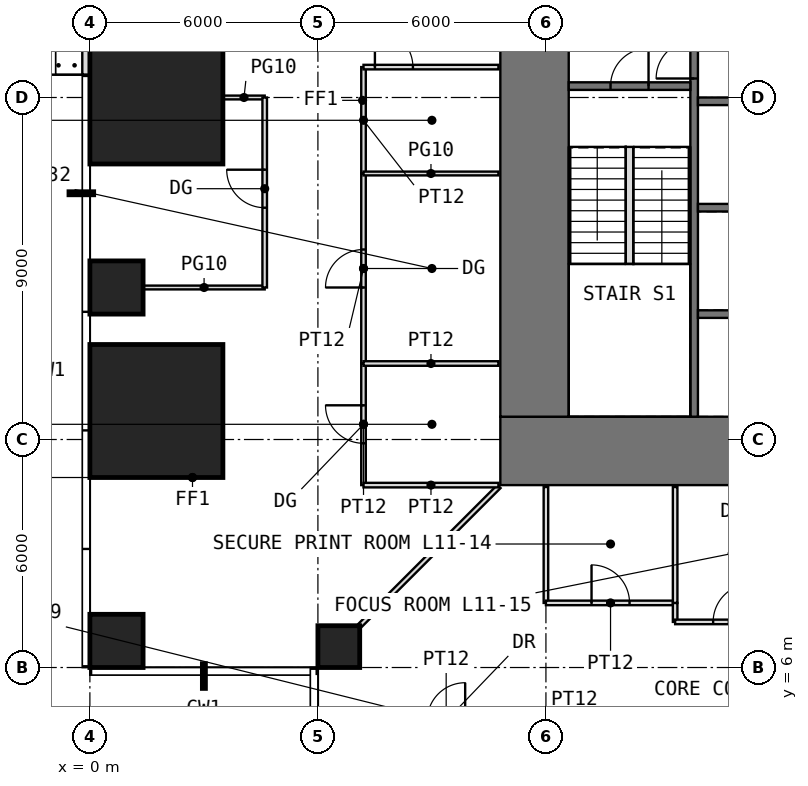
"""IFC4 building model, lengths in metres.
Left out: names, types, materials, properties, quantities, classifications, styles, units other than length and angle.
Written with IfcOpenShell. Run it as: python <this file> out.ifc"""

import sys

from ifc_helpers import new_model, si_unit, direction, frame, frame_2d, origin, origin_2d, place, context, subcontext, project, spatial, rectangle, extrude, element, fill, save


model = new_model("IFC4")
c1 = context("Model", 3, precision=1e-05, world=origin(), true_north=direction((0.0, 1.0)))
c2 = subcontext(c1, "Body", "Model", "MODEL_VIEW")
j1 = project(units=[si_unit("LENGTHUNIT", "METRE"), si_unit("PLANEANGLEUNIT", "RADIAN")], contexts=[c1])
p1 = place(None, origin())
s1 = spatial("IfcSite", under=j1, at=p1, CompositionType="ELEMENT")
p2 = place(p1, origin())
s2 = spatial("IfcBuilding", under=s1, at=p2, CompositionType="ELEMENT")
p3 = place(p2, frame((0.0, 0.0, 50.5)))
s3 = spatial("IfcBuildingStorey", under=s2, at=p3, CompositionType="ELEMENT", Elevation=50.5)
p4 = place(p3, frame((0.7, 6.7, 0.0), z_axis=(0.0, 0.0, 1.0), x_axis=(1.0, 0.0, 0.0)))
e1 = element("IfcColumn", 1, at=p4, inside=s3, PredefinedType="COLUMN", context=c2, shape_type="SweptSolid", body=[
    extrude(rectangle(XDim=1.4, YDim=1.4, at=origin_2d()), origin(), (0.0, 0.0, 1.0), 4.0),
])
p5 = place(p3, frame((6.55, 6.55, 0.0), z_axis=(0.0, 0.0, 1.0), x_axis=(1.0, 0.0, 0.0)))
e2 = element("IfcColumn", 2, at=p5, inside=s3, PredefinedType="COLUMN", context=c2, shape_type="SweptSolid", body=[
    extrude(rectangle(XDim=1.1, YDim=1.1, at=origin_2d()), origin(), (0.0, 0.0, 1.0), 4.0),
])
p6 = place(p3, frame((1.75, 12.75, 0.0), z_axis=(0.0, 0.0, 1.0), x_axis=(1.0, 0.0, 0.0)))
e3 = element("IfcColumn", 3, at=p6, inside=s3, PredefinedType="COLUMN", context=c2, shape_type="SweptSolid", body=[
    extrude(rectangle(XDim=3.5, YDim=3.5, at=origin_2d()), origin(), (0.0, 0.0, 1.0), 4.0),
])
p7 = place(p3, frame((0.7, 16.0, 0.0), z_axis=(0.0, 0.0, 1.0), x_axis=(1.0, 0.0, 0.0)))
e4 = element("IfcColumn", 4, at=p7, inside=s3, PredefinedType="COLUMN", context=c2, shape_type="SweptSolid", body=[
    extrude(rectangle(XDim=1.4, YDim=1.4, at=origin_2d()), origin(), (0.0, 0.0, 1.0), 4.0),
])
p8 = place(p3, frame((1.75, 21.0, 0.0), z_axis=(0.0, 0.0, 1.0), x_axis=(1.0, 0.0, 0.0)))
e5 = element("IfcColumn", 5, at=p8, inside=s3, PredefinedType="COLUMN", context=c2, shape_type="SweptSolid", body=[
    extrude(rectangle(XDim=3.5, YDim=3.5, at=origin_2d()), origin(), (0.0, 0.0, 1.0), 4.0),
])
p9 = place(p3, frame((-0.1, 25.4, 0.0), z_axis=(0.0, 0.0, 1.0), x_axis=(0.0, -1.0, 0.0)))
e6 = element("IfcWall", 6, at=p9, inside=s3, PredefinedType="USERDEFINED", context=c2, shape_type="SweptSolid", body=[
    extrude(rectangle(XDim=3.8, YDim=0.2, at=frame_2d((1.9, 0.0))), origin(), (0.0, 0.0, 1.0), 3.75),
])
p10 = place(p9, frame((1.5, 0.0, 0.0)))
e7 = element("IfcOpeningElement", 7, at=p10, cuts=e6, PredefinedType="OPENING", context=c2, shape_type="SweptSolid", body=[
    extrude(rectangle(XDim=1.0, YDim=2.4, at=frame_2d((0.5, 1.2))), frame((0.0, 0.11, 0.0), z_axis=(0.0, -1.0, 0.0), x_axis=(1.0, 0.0, 0.0)), (0.0, 0.0, 1.0), 0.22),
])
p11 = place(p3, frame((10.8, 11.7, -0.05), z_axis=(0.0, 0.0, 1.0), x_axis=(1.0, 0.0, 0.0)))
e8 = element("IfcWall", 8, at=p11, inside=s3, PredefinedType="SHEAR", context=c2, shape_type="SweptSolid", body=[
    extrude(rectangle(XDim=20.4, YDim=1.8, at=frame_2d((10.2, 0.0))), origin(), (0.0, 0.0, 1.0), 4.0),
])
p12 = place(p11, frame((9.2, 0.0, 0.05)))
e9 = element("IfcOpeningElement", 9, at=p12, cuts=e8, PredefinedType="OPENING", context=c2, shape_type="SweptSolid", body=[
    extrude(rectangle(XDim=2.0, YDim=2.2, at=frame_2d((1.0, 1.1))), frame((0.0, 0.91, 0.0), z_axis=(0.0, -1.0, 0.0), x_axis=(1.0, 0.0, 0.0)), (0.0, 0.0, 1.0), 1.82),
])
p13 = place(p3, frame((11.7, 12.6, -0.05), z_axis=(0.0, 0.0, 1.0), x_axis=(0.0, 1.0, 0.0)))
e10 = element("IfcWall", 10, at=p13, inside=s3, PredefinedType="SHEAR", context=c2, shape_type="SweptSolid", body=[
    extrude(rectangle(XDim=16.8, YDim=1.8, at=frame_2d((8.4, 0.0))), origin(), (0.0, 0.0, 1.0), 4.0),
])
p14 = place(p13, frame((9.9, 0.0, 0.05)))
e11 = element("IfcOpeningElement", 11, at=p14, cuts=e10, PredefinedType="OPENING", context=c2, shape_type="SweptSolid", body=[
    extrude(rectangle(XDim=1.0, YDim=2.2, at=frame_2d((0.5, 1.1))), frame((0.0, 0.91, 0.0), z_axis=(0.0, -1.0, 0.0), x_axis=(1.0, 0.0, 0.0)), (0.0, 0.0, 1.0), 1.82),
])
p15 = place(p3, frame((15.9, 12.6, -0.05), z_axis=(0.0, 0.0, 1.0), x_axis=(0.0, 1.0, 0.0)))
e12 = element("IfcWall", 12, at=p15, inside=s3, PredefinedType="SHEAR", context=c2, shape_type="SweptSolid", body=[
    extrude(rectangle(XDim=16.8, YDim=0.2, at=frame_2d((8.4, 0.0))), origin(), (0.0, 0.0, 1.0), 4.0),
])
p16 = place(p15, frame((8.9, 0.0, 0.05)))
e13 = element("IfcOpeningElement", 13, at=p16, cuts=e12, PredefinedType="OPENING", context=c2, shape_type="SweptSolid", body=[
    extrude(rectangle(XDim=1.0, YDim=2.2, at=frame_2d((0.5, 1.1))), frame((0.0, 0.11, 0.0), z_axis=(0.0, -1.0, 0.0), x_axis=(1.0, 0.0, 0.0)), (0.0, 0.0, 1.0), 0.22),
])
p17 = place(p3, frame((12.6, 21.3, -0.05), z_axis=(0.0, 0.0, 1.0), x_axis=(1.0, 0.0, 0.0)))
e14 = element("IfcWall", 14, at=p17, inside=s3, PredefinedType="SHEAR", context=c2, shape_type="SweptSolid", body=[
    extrude(rectangle(XDim=3.2, YDim=0.2, at=frame_2d((1.6, 0.0))), origin(), (0.0, 0.0, 1.0), 4.0),
])
p18 = place(p17, frame((1.1, 0.0, 0.05)))
e15 = element("IfcOpeningElement", 15, at=p18, cuts=e14, PredefinedType="OPENING", context=c2, shape_type="SweptSolid", body=[
    extrude(rectangle(XDim=1.0, YDim=2.2, at=frame_2d((0.5, 1.1))), frame((0.0, 0.11, 0.0), z_axis=(0.0, -1.0, 0.0), x_axis=(1.0, 0.0, 0.0)), (0.0, 0.0, 1.0), 0.22),
])
for number, where, z_axis, x_axis in (
    (16, (16.0, 15.3, -0.05), (0.0, 0.0, 1.0), (1.0, 0.0, 0.0)),
    (17, (16.0, 18.1, -0.05), (0.0, 0.0, 1.0), (1.0, 0.0, 0.0)),
    (18, (16.0, 20.9, -0.05), (0.0, 0.0, 1.0), (1.0, 0.0, 0.0)),
):
    element("IfcWall", number, at=place(p3, frame(where, z_axis=z_axis, x_axis=x_axis)), inside=s3, PredefinedType="SHEAR", context=c2, shape_type="SweptSolid", body=[
        extrude(rectangle(XDim=3.2, YDim=0.2, at=frame_2d((1.6, 0.0))), origin(), (0.0, 0.0, 1.0), 4.0),
    ])
p19 = place(p3, frame((1.41, 16.0, 0.0), z_axis=(0.0, 0.0, 1.0), x_axis=(1.0, 0.0, 0.0)))
e19 = element("IfcWall", 19, at=p19, inside=s3, PredefinedType="PARTITIONING", context=c2, shape_type="SweptSolid", body=[
    extrude(rectangle(XDim=3.19, YDim=0.1, at=frame_2d((1.595, 0.0))), origin(), (0.0, 0.0, 1.0), 3.75),
])
p20 = place(p3, frame((3.51, 21.0, 0.0), z_axis=(0.0, 0.0, 1.0), x_axis=(1.0, 0.0, 0.0)))
e20 = element("IfcWall", 20, at=p20, inside=s3, PredefinedType="PARTITIONING", context=c2, shape_type="SweptSolid", body=[
    extrude(rectangle(XDim=1.09, YDim=0.1, at=frame_2d((0.545, 0.0))), origin(), (0.0, 0.0, 1.0), 3.75),
])
p21 = place(p3, frame((4.6, 16.0, 0.0), z_axis=(0.0, 0.0, 1.0), x_axis=(0.0, 1.0, 0.0)))
e21 = element("IfcWall", 21, at=p21, inside=s3, PredefinedType="PARTITIONING", context=c2, shape_type="SweptSolid", body=[
    extrude(rectangle(XDim=5.0, YDim=0.12, at=frame_2d((2.5, 0.0))), origin(), (0.0, 0.0, 1.0), 3.75),
])
p22 = place(p21, frame((2.1, 0.0, 0.0)))
e22 = element("IfcOpeningElement", 22, at=p22, cuts=e21, PredefinedType="OPENING", context=c2, shape_type="SweptSolid", body=[
    extrude(rectangle(XDim=1.0, YDim=2.4, at=frame_2d((0.5, 1.2))), frame((0.0, 0.07, 0.0), z_axis=(0.0, -1.0, 0.0), x_axis=(1.0, 0.0, 0.0)), (0.0, 0.0, 1.0), 0.14),
])
p23 = place(p3, frame((7.11, 7.11, 0.0), z_axis=(0.0, 0.0, 1.0), x_axis=(0.707106781187, 0.707106781187, 0.0)))
e23 = element("IfcWall", 23, at=p23, inside=s3, PredefinedType="PARTITIONING", context=c2, shape_type="SweptSolid", body=[
    extrude(rectangle(XDim=5.168, YDim=0.12, at=frame_2d((2.584, 0.0))), origin(), (0.0, 0.0, 1.0), 3.75),
])
p24 = place(p3, frame((7.2, 10.8, 0.0), z_axis=(0.0, 0.0, 1.0), x_axis=(0.0, 1.0, 0.0)))
e24 = element("IfcWall", 24, at=p24, inside=s3, PredefinedType="PARTITIONING", context=c2, shape_type="SweptSolid", body=[
    extrude(rectangle(XDim=3.2, YDim=0.12, at=frame_2d((1.6, 0.0))), origin(), (0.0, 0.0, 1.0), 3.75),
])
p25 = place(p24, frame((1.1, 0.0, 0.0)))
e25 = element("IfcOpeningElement", 25, at=p25, cuts=e24, PredefinedType="OPENING", context=c2, shape_type="SweptSolid", body=[
    extrude(rectangle(XDim=1.0, YDim=2.4, at=frame_2d((0.5, 1.2))), frame((0.0, 0.07, 0.0), z_axis=(0.0, -1.0, 0.0), x_axis=(1.0, 0.0, 0.0)), (0.0, 0.0, 1.0), 0.14),
])
p26 = place(p3, frame((7.2, 10.8, 0.0), z_axis=(0.0, 0.0, 1.0), x_axis=(1.0, 0.0, 0.0)))
e26 = element("IfcWall", 26, at=p26, inside=s3, PredefinedType="PARTITIONING", context=c2, shape_type="SweptSolid", body=[
    extrude(rectangle(XDim=3.55, YDim=0.12, at=frame_2d((1.775, 0.0))), origin(), (0.0, 0.0, 1.0), 3.75),
])
p27 = place(p3, frame((7.2, 14.0, 0.0), z_axis=(0.0, 0.0, 1.0), x_axis=(0.0, 1.0, 0.0)))
e27 = element("IfcWall", 27, at=p27, inside=s3, PredefinedType="PARTITIONING", context=c2, shape_type="SweptSolid", body=[
    extrude(rectangle(XDim=5.0, YDim=0.12, at=frame_2d((2.5, 0.0))), origin(), (0.0, 0.0, 1.0), 3.75),
])
p28 = place(p27, frame((2.0, 0.0, 0.0)))
e28 = element("IfcOpeningElement", 28, at=p28, cuts=e27, PredefinedType="OPENING", context=c2, shape_type="SweptSolid", body=[
    extrude(rectangle(XDim=1.0, YDim=2.4, at=frame_2d((0.5, 1.2))), frame((0.0, 0.07, 0.0), z_axis=(0.0, -1.0, 0.0), x_axis=(1.0, 0.0, 0.0)), (0.0, 0.0, 1.0), 0.14),
])
p29 = place(p3, frame((7.2, 14.0, 0.0), z_axis=(0.0, 0.0, 1.0), x_axis=(1.0, 0.0, 0.0)))
e29 = element("IfcWall", 29, at=p29, inside=s3, PredefinedType="PARTITIONING", context=c2, shape_type="SweptSolid", body=[
    extrude(rectangle(XDim=3.55, YDim=0.12, at=frame_2d((1.775, 0.0))), origin(), (0.0, 0.0, 1.0), 3.75),
])
p30 = place(p3, frame((7.2, 19.0, 0.0), z_axis=(0.0, 0.0, 1.0), x_axis=(0.0, 1.0, 0.0)))
e30 = element("IfcWall", 30, at=p30, inside=s3, PredefinedType="PARTITIONING", context=c2, shape_type="SweptSolid", body=[
    extrude(rectangle(XDim=2.8, YDim=0.12, at=frame_2d((1.4, 0.0))), origin(), (0.0, 0.0, 1.0), 3.75),
])
p31 = place(p3, frame((7.2, 19.0, 0.0), z_axis=(0.0, 0.0, 1.0), x_axis=(1.0, 0.0, 0.0)))
e31 = element("IfcWall", 31, at=p31, inside=s3, PredefinedType="PARTITIONING", context=c2, shape_type="SweptSolid", body=[
    extrude(rectangle(XDim=3.55, YDim=0.1, at=frame_2d((1.775, 0.0))), origin(), (0.0, 0.0, 1.0), 3.75),
])
p32 = place(p3, frame((7.2, 21.8, 0.0), z_axis=(0.0, 0.0, 1.0), x_axis=(1.0, 0.0, 0.0)))
e32 = element("IfcWall", 32, at=p32, inside=s3, PredefinedType="PARTITIONING", context=c2, shape_type="SweptSolid", body=[
    extrude(rectangle(XDim=3.55, YDim=0.12, at=frame_2d((1.775, 0.0))), origin(), (0.0, 0.0, 1.0), 3.75),
])
p33 = place(p32, frame((0.3, 0.0, 0.0)))
e33 = element("IfcOpeningElement", 33, at=p33, cuts=e32, PredefinedType="OPENING", context=c2, shape_type="SweptSolid", body=[
    extrude(rectangle(XDim=1.0, YDim=2.4, at=frame_2d((0.5, 1.2))), frame((0.0, 0.07, 0.0), z_axis=(0.0, -1.0, 0.0), x_axis=(1.0, 0.0, 0.0)), (0.0, 0.0, 1.0), 0.14),
])
p34 = place(p3, frame((12.0, 7.7, 0.0), z_axis=(0.0, 0.0, 1.0), x_axis=(0.0, 1.0, 0.0)))
e34 = element("IfcWall", 34, at=p34, inside=s3, PredefinedType="PARTITIONING", context=c2, shape_type="SweptSolid", body=[
    extrude(rectangle(XDim=3.05, YDim=0.12, at=frame_2d((1.525, 0.0))), origin(), (0.0, 0.0, 1.0), 3.75),
])
p35 = place(p3, frame((12.0, 7.7, 0.0), z_axis=(0.0, 0.0, 1.0), x_axis=(1.0, 0.0, 0.0)))
e35 = element("IfcWall", 35, at=p35, inside=s3, PredefinedType="PARTITIONING", context=c2, shape_type="SweptSolid", body=[
    extrude(rectangle(XDim=3.4, YDim=0.12, at=frame_2d((1.7, 0.0))), origin(), (0.0, 0.0, 1.0), 3.75),
])
p36 = place(p35, frame((1.2, 0.0, 0.0)))
e36 = element("IfcOpeningElement", 36, at=p36, cuts=e35, PredefinedType="OPENING", context=c2, shape_type="SweptSolid", body=[
    extrude(rectangle(XDim=1.0, YDim=2.2, at=frame_2d((0.5, 1.1))), frame((0.0, 0.07, 0.0), z_axis=(0.0, -1.0, 0.0), x_axis=(1.0, 0.0, 0.0)), (0.0, 0.0, 1.0), 0.14),
])
p37 = place(p3, frame((15.4, 7.2, 0.0), z_axis=(0.0, 0.0, 1.0), x_axis=(0.0, 1.0, 0.0)))
e37 = element("IfcWall", 37, at=p37, inside=s3, PredefinedType="PARTITIONING", context=c2, shape_type="SweptSolid", body=[
    extrude(rectangle(XDim=0.5, YDim=0.12, at=frame_2d((0.25, 0.0))), origin(), (0.0, 0.0, 1.0), 3.75),
])
p38 = place(p3, frame((15.4, 7.2, 0.0), z_axis=(0.0, 0.0, 1.0), x_axis=(1.0, 0.0, 0.0)))
e38 = element("IfcWall", 38, at=p38, inside=s3, PredefinedType="PARTITIONING", context=c2, shape_type="SweptSolid", body=[
    extrude(rectangle(XDim=3.0, YDim=0.12, at=frame_2d((1.5, 0.0))), origin(), (0.0, 0.0, 1.0), 3.75),
])
p39 = place(p38, frame((1.0, 0.0, 0.0)))
e39 = element("IfcOpeningElement", 39, at=p39, cuts=e38, PredefinedType="OPENING", context=c2, shape_type="SweptSolid", body=[
    extrude(rectangle(XDim=1.0, YDim=2.4, at=frame_2d((0.5, 1.2))), frame((0.0, 0.07, 0.0), z_axis=(0.0, -1.0, 0.0), x_axis=(1.0, 0.0, 0.0)), (0.0, 0.0, 1.0), 0.14),
])
p40 = place(p3, frame((15.4, 7.7, 0.0), z_axis=(0.0, 0.0, 1.0), x_axis=(0.0, 1.0, 0.0)))
e40 = element("IfcWall", 40, at=p40, inside=s3, PredefinedType="PARTITIONING", context=c2, shape_type="SweptSolid", body=[
    extrude(rectangle(XDim=3.05, YDim=0.12, at=frame_2d((1.525, 0.0))), origin(), (0.0, 0.0, 1.0), 3.75),
])
p41 = place(p3, frame((14.2, 16.62, 0.0), z_axis=(0.0, 0.0, 1.0), x_axis=(0.0, 1.0, 0.0)))
e41 = element("IfcWall", 41, at=p41, inside=s3, PredefinedType="PARTITIONING", context=c2, shape_type="SweptSolid", body=[
    extrude(rectangle(XDim=3.08, YDim=0.2, at=frame_2d((1.54, 0.0))), origin(), (0.0, 0.0, 1.0), 4.0),
])
p42 = place(p18, origin())
e42 = element("IfcDoor", 42, at=p42, inside=s3, OperationType="SINGLE_SWING_RIGHT", PredefinedType="DOOR", context=c2, shape_type="SweptSolid", body=[
    extrude(rectangle(XDim=1.0, YDim=2.2, at=frame_2d((0.5, 1.1))), frame((0.0, 0.025, 0.0), z_axis=(0.0, -1.0, 0.0), x_axis=(1.0, 0.0, 0.0)), (0.0, 0.0, 1.0), 0.05),
])
fill(e15, e42)
p43 = place(p16, origin())
e43 = element("IfcDoor", 43, at=p43, inside=s3, OperationType="SINGLE_SWING_LEFT", PredefinedType="DOOR", context=c2, shape_type="SweptSolid", body=[
    extrude(rectangle(XDim=1.0, YDim=2.2, at=frame_2d((0.5, 1.1))), frame((0.0, 0.025, 0.0), z_axis=(0.0, -1.0, 0.0), x_axis=(1.0, 0.0, 0.0)), (0.0, 0.0, 1.0), 0.05),
])
fill(e13, e43)
p44 = place(p36, origin())
e44 = element("IfcDoor", 44, at=p44, inside=s3, OperationType="SINGLE_SWING_LEFT", PredefinedType="DOOR", context=c2, shape_type="SweptSolid", body=[
    extrude(rectangle(XDim=1.0, YDim=2.2, at=frame_2d((0.5, 1.1))), frame((0.0, 0.025, 0.0), z_axis=(0.0, -1.0, 0.0), x_axis=(1.0, 0.0, 0.0)), (0.0, 0.0, 1.0), 0.05),
])
fill(e36, e44)
p45 = place(p39, origin())
e45 = element("IfcDoor", 45, at=p45, inside=s3, OperationType="SINGLE_SWING_RIGHT", PredefinedType="DOOR", context=c2, shape_type="SweptSolid", body=[
    extrude(rectangle(XDim=1.0, YDim=2.4, at=frame_2d((0.5, 1.2))), frame((0.0, 0.025, 0.0), z_axis=(0.0, -1.0, 0.0), x_axis=(1.0, 0.0, 0.0)), (0.0, 0.0, 1.0), 0.05),
])
fill(e39, e45)
p46 = place(p25, origin())
e46 = element("IfcDoor", 46, at=p46, inside=s3, OperationType="SINGLE_SWING_RIGHT", PredefinedType="DOOR", context=c2, shape_type="SweptSolid", body=[
    extrude(rectangle(XDim=1.0, YDim=2.4, at=frame_2d((0.5, 1.2))), frame((0.0, 0.025, 0.0), z_axis=(0.0, -1.0, 0.0), x_axis=(1.0, 0.0, 0.0)), (0.0, 0.0, 1.0), 0.05),
])
fill(e25, e46)
p47 = place(p28, origin())
e47 = element("IfcDoor", 47, at=p47, inside=s3, OperationType="SINGLE_SWING_LEFT", PredefinedType="DOOR", context=c2, shape_type="SweptSolid", body=[
    extrude(rectangle(XDim=1.0, YDim=2.4, at=frame_2d((0.5, 1.2))), frame((0.0, 0.025, 0.0), z_axis=(0.0, -1.0, 0.0), x_axis=(1.0, 0.0, 0.0)), (0.0, 0.0, 1.0), 0.05),
])
fill(e28, e47)
p48 = place(p22, origin())
e48 = element("IfcDoor", 48, at=p48, inside=s3, OperationType="SINGLE_SWING_RIGHT", PredefinedType="DOOR", context=c2, shape_type="SweptSolid", body=[
    extrude(rectangle(XDim=1.0, YDim=2.4, at=frame_2d((0.5, 1.2))), frame((0.0, 0.025, 0.0), z_axis=(0.0, -1.0, 0.0), x_axis=(1.0, 0.0, 0.0)), (0.0, 0.0, 1.0), 0.05),
])
fill(e22, e48)
p49 = place(p33, origin())
e49 = element("IfcDoor", 49, at=p49, inside=s3, OperationType="SINGLE_SWING_LEFT", PredefinedType="DOOR", context=c2, shape_type="SweptSolid", body=[
    extrude(rectangle(XDim=1.0, YDim=2.4, at=frame_2d((0.5, 1.2))), frame((0.0, 0.025, 0.0), z_axis=(0.0, -1.0, 0.0), x_axis=(1.0, 0.0, 0.0)), (0.0, 0.0, 1.0), 0.05),
])
fill(e33, e49)
save(model, sys.argv[1])
